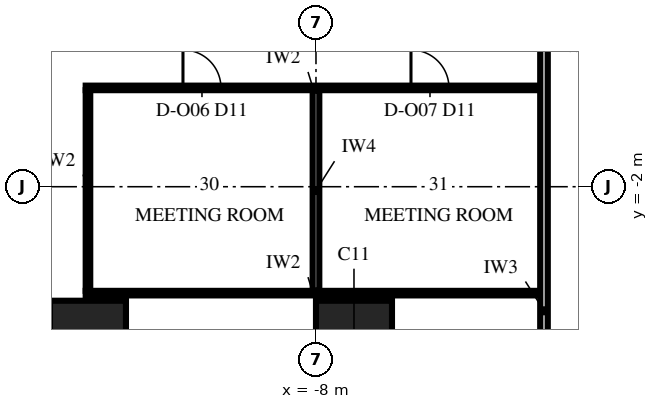
"""IFC4 building model, lengths in metres.
Left out: names, types, materials, properties, quantities, classifications, styles, units other than length and angle.
Written with IfcOpenShell. Run it as: python <this file> out.ifc"""

import sys

from ifc_helpers import new_model, si_unit, direction, frame, frame_2d, origin, origin_2d, place, context, subcontext, project, spatial, rectangle, extrude, element, fill, save


model = new_model("IFC4")
c1 = context("Model", 3, precision=1e-05, world=origin(), true_north=direction((0.0, 1.0)))
c2 = subcontext(c1, "Body", "Model", "MODEL_VIEW")
j1 = project(units=[si_unit("LENGTHUNIT", "METRE"), si_unit("PLANEANGLEUNIT", "RADIAN")], contexts=[c1])
p1 = place(None, origin())
s1 = spatial("IfcSite", under=j1, at=p1, CompositionType="ELEMENT")
p2 = place(p1, origin())
s2 = spatial("IfcBuilding", under=s1, at=p2, CompositionType="ELEMENT")
p3 = place(p2, frame((0.0, 0.0, 60.0)))
s3 = spatial("IfcBuildingStorey", under=s2, at=p3, CompositionType="ELEMENT", Elevation=60.0)
for number, where, z_axis, x_axis in (
    (1, (-14.0, -6.0, 0.0), (0.0, 0.0, 1.0), (1.0, 0.0, 0.0)),
    (2, (-7.0, -6.0, 0.0), (0.0, 0.0, 1.0), (1.0, 0.0, 0.0)),
):
    element("IfcColumn", number, at=place(p3, frame(where, z_axis=z_axis, x_axis=x_axis)), inside=s3, PredefinedType="COLUMN", context=c2, shape_type="SweptSolid", body=[
        extrude(rectangle(XDim=2.0, YDim=2.0, at=origin_2d()), origin(), (0.0, 0.0, 1.0), 4.0),
    ])
p4 = place(p3, frame((-14.06, -4.8, 0.0), z_axis=(0.0, 0.0, 1.0), x_axis=(1.0, 0.0, 0.0)))
e3 = element("IfcWall", 3, at=p4, inside=s3, PredefinedType="PARTITIONING", context=c2, shape_type="SweptSolid", body=[
    extrude(rectangle(XDim=11.96, YDim=0.12, at=frame_2d((5.98, 0.0))), origin(), (0.0, 0.0, 1.0), 3.25),
])
p5 = place(p3, frame((-14.06, 0.6, 0.0), z_axis=(0.0, 0.0, 1.0), x_axis=(1.0, 0.0, 0.0)))
e4 = element("IfcWall", 4, at=p5, inside=s3, PredefinedType="PARTITIONING", context=c2, shape_type="SweptSolid", body=[
    extrude(rectangle(XDim=11.96, YDim=0.12, at=frame_2d((5.98, 0.0))), origin(), (0.0, 0.0, 1.0), 3.25),
])
p6 = place(p5, frame((2.56, 0.0, 0.0)))
e5 = element("IfcOpeningElement", 5, at=p6, cuts=e4, PredefinedType="OPENING", context=c2, shape_type="SweptSolid", body=[
    extrude(rectangle(XDim=1.0, YDim=2.4, at=frame_2d((0.5, 1.2))), frame((0.0, 0.075, 0.0), z_axis=(0.0, -1.0, 0.0), x_axis=(1.0, 0.0, 0.0)), (0.0, 0.0, 1.0), 0.15),
])
p7 = place(p5, frame((8.56, 0.0, 0.0)))
e6 = element("IfcOpeningElement", 6, at=p7, cuts=e4, PredefinedType="OPENING", context=c2, shape_type="SweptSolid", body=[
    extrude(rectangle(XDim=1.0, YDim=2.4, at=frame_2d((0.5, 1.2))), frame((0.0, 0.075, 0.0), z_axis=(0.0, -1.0, 0.0), x_axis=(1.0, 0.0, 0.0)), (0.0, 0.0, 1.0), 0.15),
])
p8 = place(p3, frame((-14.0, -4.74, 0.0), z_axis=(0.0, 0.0, 1.0), x_axis=(0.0, 1.0, 0.0)))
e7 = element("IfcWall", 7, at=p8, inside=s3, PredefinedType="PARTITIONING", context=c2, shape_type="SweptSolid", body=[
    extrude(rectangle(XDim=5.28, YDim=0.12, at=frame_2d((2.64, 0.0))), origin(), (0.0, 0.0, 1.0), 3.25),
])
p9 = place(p3, frame((-8.0, -4.74, 0.0), z_axis=(0.0, 0.0, 1.0), x_axis=(0.0, 1.0, 0.0)))
e8 = element("IfcWall", 8, at=p9, inside=s3, PredefinedType="PARTITIONING", context=c2, shape_type="SweptSolid", body=[
    extrude(rectangle(XDim=5.28, YDim=0.175, at=frame_2d((2.64, 0.0))), origin(), (0.0, 0.0, 1.0), 3.85),
])
p10 = place(p3, frame((-2.0, -16.2, 0.0), z_axis=(0.0, 0.0, 1.0), x_axis=(0.0, 1.0, 0.0)))
e9 = element("IfcWall", 9, at=p10, inside=s3, PredefinedType="PARTITIONING", context=c2, shape_type="SweptSolid", body=[
    extrude(rectangle(XDim=21.87, YDim=0.2, at=frame_2d((10.935, 0.0))), origin(), (0.0, 0.0, 1.0), 2.842),
])
p11 = place(p6, origin())
e10 = element("IfcDoor", 10, at=p11, inside=s3, OperationType="SINGLE_SWING_RIGHT", PredefinedType="DOOR", context=c2, shape_type="SweptSolid", body=[
    extrude(rectangle(XDim=1.0, YDim=2.4, at=frame_2d((0.5, 1.2))), frame((0.0, 0.06, 0.0), z_axis=(0.0, -1.0, 0.0), x_axis=(1.0, 0.0, 0.0)), (0.0, 0.0, 1.0), 0.12),
])
fill(e5, e10)
p12 = place(p7, origin())
e11 = element("IfcDoor", 11, at=p12, inside=s3, OperationType="SINGLE_SWING_RIGHT", PredefinedType="DOOR", context=c2, shape_type="SweptSolid", body=[
    extrude(rectangle(XDim=1.0, YDim=2.4, at=frame_2d((0.5, 1.2))), frame((0.0, 0.06, 0.0), z_axis=(0.0, -1.0, 0.0), x_axis=(1.0, 0.0, 0.0)), (0.0, 0.0, 1.0), 0.12),
])
fill(e6, e11)
save(model, sys.argv[1])
